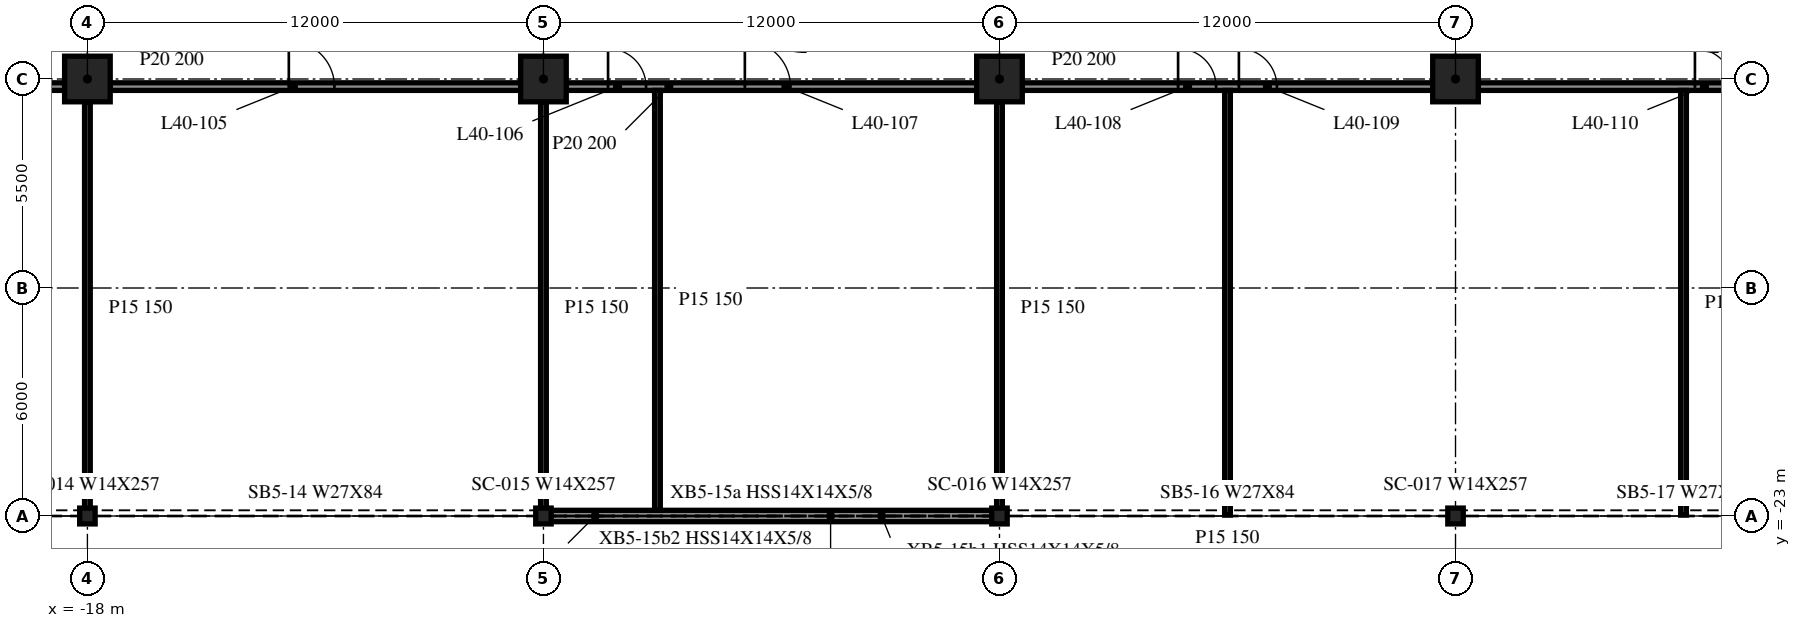
"""IFC4 building model, lengths in metres.
Left out: names, types, materials, properties, quantities, classifications, styles, units other than length and angle.
Written with IfcOpenShell. Run it as: python <this file> out.ifc"""

import sys

from ifc_helpers import new_model, si_unit, direction, frame, frame_2d, origin, origin_2d, place, context, subcontext, project, spatial, rectangle, i_section, extrude, element, fill, save


model = new_model("IFC4")
c1 = context("Model", 3, precision=1e-05, world=origin(), true_north=direction((0.0, 1.0)))
c2 = subcontext(c1, "Body", "Model", "MODEL_VIEW")
j1 = project(units=[si_unit("LENGTHUNIT", "METRE"), si_unit("PLANEANGLEUNIT", "RADIAN")], contexts=[c1])
p1 = place(None, origin())
s1 = spatial("IfcSite", under=j1, at=p1, CompositionType="ELEMENT")
p2 = place(p1, origin())
s2 = spatial("IfcBuilding", under=s1, at=p2, CompositionType="ELEMENT")
p3 = place(p2, frame((0.0, 0.0, 170.6)))
s3 = spatial("IfcBuildingStorey", under=s2, at=p3, CompositionType="ELEMENT", Elevation=170.6)
for number, where, z_axis, x_axis in (
    (1, (-18.0, -11.5, -0.34), (0.0, 0.0, 1.0), (1.0, 0.0, 0.0)),
    (2, (-6.0, -11.5, -0.34), (0.0, 0.0, 1.0), (1.0, 0.0, 0.0)),
    (3, (6.0, -11.5, -0.34), (0.0, 0.0, 1.0), (1.0, 0.0, 0.0)),
    (4, (18.0, -11.5, -0.34), (0.0, 0.0, 1.0), (1.0, 0.0, 0.0)),
):
    element("IfcColumn", number, at=place(p3, frame(where, z_axis=z_axis, x_axis=x_axis)), inside=s3, PredefinedType="COLUMN", context=c2, shape_type="SweptSolid", body=[
        extrude(rectangle(XDim=1.2, YDim=1.2, at=origin_2d()), origin(), (0.0, 0.0, 1.0), 3.8),
    ])
for number, where, z_axis, x_axis in (
    (5, (-18.0, -23.0, -0.34), (0.0, 0.0, 1.0), (1.0, 0.0, 0.0)),
    (6, (-6.0, -23.0, -0.34), (0.0, 0.0, 1.0), (1.0, 0.0, 0.0)),
    (7, (6.0, -23.0, -0.34), (0.0, 0.0, 1.0), (1.0, 0.0, 0.0)),
    (8, (18.0, -23.0, -0.34), (0.0, 0.0, 1.0), (1.0, 0.0, 0.0)),
):
    element("IfcColumn", number, at=place(p3, frame(where, z_axis=z_axis, x_axis=x_axis)), inside=s3, PredefinedType="COLUMN", context=c2, shape_type="SweptSolid", body=[
        extrude(i_section(OverallWidth=0.406, OverallDepth=0.417, WebThickness=0.03, FlangeThickness=0.048, at=origin_2d()), origin(), (0.0, 0.0, 1.0), 3.8),
    ])
p4 = place(p3, frame((-5.985, -23.0, 0.0), z_axis=(0.0, 0.0, 1.0), x_axis=(1.0, 0.0, 0.0)))
e9 = element("IfcWall", 9, at=p4, inside=s3, PredefinedType="NOTDEFINED", context=c2, shape_type="SweptSolid", body=[
    extrude(rectangle(XDim=11.97, YDim=0.3, at=frame_2d((5.985, 0.0))), origin(), (0.0, 0.0, 1.0), 2.782),
])
p5 = place(p3, frame((-29.4, -11.7, 0.0), z_axis=(0.0, 0.0, 1.0), x_axis=(1.0, 0.0, 0.0)))
e10 = element("IfcWall", 10, at=p5, inside=s3, PredefinedType="PARTITIONING", context=c2, shape_type="SweptSolid", body=[
    extrude(rectangle(XDim=10.8, YDim=0.2, at=frame_2d((5.4, 0.0))), origin(), (0.0, 0.0, 1.0), 3.46),
])
p6 = place(p5, frame((4.1, 0.0, 0.0)))
e11 = element("IfcOpeningElement", 11, at=p6, cuts=e10, PredefinedType="OPENING", context=c2, shape_type="SweptSolid", body=[
    extrude(rectangle(XDim=1.0, YDim=2.1, at=frame_2d((0.5, 1.05))), frame((0.0, 0.11, 0.0), z_axis=(0.0, -1.0, 0.0), x_axis=(1.0, 0.0, 0.0)), (0.0, 0.0, 1.0), 0.22),
])
p7 = place(p5, frame((5.7, 0.0, 0.0)))
e12 = element("IfcOpeningElement", 12, at=p7, cuts=e10, PredefinedType="OPENING", context=c2, shape_type="SweptSolid", body=[
    extrude(rectangle(XDim=1.0, YDim=2.1, at=frame_2d((0.5, 1.05))), frame((0.0, 0.11, 0.0), z_axis=(0.0, -1.0, 0.0), x_axis=(1.0, 0.0, 0.0)), (0.0, 0.0, 1.0), 0.22),
])
p8 = place(p3, frame((-17.4, -11.7, 0.0), z_axis=(0.0, 0.0, 1.0), x_axis=(1.0, 0.0, 0.0)))
e13 = element("IfcWall", 13, at=p8, inside=s3, PredefinedType="PARTITIONING", context=c2, shape_type="SweptSolid", body=[
    extrude(rectangle(XDim=10.8, YDim=0.2, at=frame_2d((5.4, 0.0))), origin(), (0.0, 0.0, 1.0), 3.46),
])
p9 = place(p8, frame((4.7, 0.0, 0.0)))
e14 = element("IfcOpeningElement", 14, at=p9, cuts=e13, PredefinedType="OPENING", context=c2, shape_type="SweptSolid", body=[
    extrude(rectangle(XDim=1.2, YDim=2.1, at=frame_2d((0.6, 1.05))), frame((0.0, 0.11, 0.0), z_axis=(0.0, -1.0, 0.0), x_axis=(1.0, 0.0, 0.0)), (0.0, 0.0, 1.0), 0.22),
])
p10 = place(p3, frame((-5.4, -11.7, 0.0), z_axis=(0.0, 0.0, 1.0), x_axis=(1.0, 0.0, 0.0)))
e15 = element("IfcWall", 15, at=p10, inside=s3, PredefinedType="PARTITIONING", context=c2, shape_type="SweptSolid", body=[
    extrude(rectangle(XDim=10.8, YDim=0.2, at=frame_2d((5.4, 0.0))), origin(), (0.0, 0.0, 1.0), 3.46),
])
p11 = place(p10, frame((1.1, 0.0, 0.0)))
e16 = element("IfcOpeningElement", 16, at=p11, cuts=e15, PredefinedType="OPENING", context=c2, shape_type="SweptSolid", body=[
    extrude(rectangle(XDim=1.0, YDim=2.1, at=frame_2d((0.5, 1.05))), frame((0.0, 0.11, 0.0), z_axis=(0.0, -1.0, 0.0), x_axis=(1.0, 0.0, 0.0)), (0.0, 0.0, 1.0), 0.22),
])
p12 = place(p10, frame((4.7, 0.0, 0.0)))
e17 = element("IfcOpeningElement", 17, at=p12, cuts=e15, PredefinedType="OPENING", context=c2, shape_type="SweptSolid", body=[
    extrude(rectangle(XDim=1.2, YDim=2.1, at=frame_2d((0.6, 1.05))), frame((0.0, 0.11, 0.0), z_axis=(0.0, -1.0, 0.0), x_axis=(1.0, 0.0, 0.0)), (0.0, 0.0, 1.0), 0.22),
])
p13 = place(p3, frame((6.6, -11.7, 0.0), z_axis=(0.0, 0.0, 1.0), x_axis=(1.0, 0.0, 0.0)))
e18 = element("IfcWall", 18, at=p13, inside=s3, PredefinedType="PARTITIONING", context=c2, shape_type="SweptSolid", body=[
    extrude(rectangle(XDim=10.8, YDim=0.2, at=frame_2d((5.4, 0.0))), origin(), (0.0, 0.0, 1.0), 3.46),
])
p14 = place(p13, frame((4.1, 0.0, 0.0)))
e19 = element("IfcOpeningElement", 19, at=p14, cuts=e18, PredefinedType="OPENING", context=c2, shape_type="SweptSolid", body=[
    extrude(rectangle(XDim=1.0, YDim=2.1, at=frame_2d((0.5, 1.05))), frame((0.0, 0.11, 0.0), z_axis=(0.0, -1.0, 0.0), x_axis=(1.0, 0.0, 0.0)), (0.0, 0.0, 1.0), 0.22),
])
p15 = place(p13, frame((5.7, 0.0, 0.0)))
e20 = element("IfcOpeningElement", 20, at=p15, cuts=e18, PredefinedType="OPENING", context=c2, shape_type="SweptSolid", body=[
    extrude(rectangle(XDim=1.0, YDim=2.1, at=frame_2d((0.5, 1.05))), frame((0.0, 0.11, 0.0), z_axis=(0.0, -1.0, 0.0), x_axis=(1.0, 0.0, 0.0)), (0.0, 0.0, 1.0), 0.22),
])
p16 = place(p3, frame((18.6, -11.7, 0.0), z_axis=(0.0, 0.0, 1.0), x_axis=(1.0, 0.0, 0.0)))
e21 = element("IfcWall", 21, at=p16, inside=s3, PredefinedType="PARTITIONING", context=c2, shape_type="SweptSolid", body=[
    extrude(rectangle(XDim=10.8, YDim=0.2, at=frame_2d((5.4, 0.0))), origin(), (0.0, 0.0, 1.0), 3.46),
])
p17 = place(p16, frame((5.7, 0.0, 0.0)))
e22 = element("IfcOpeningElement", 22, at=p17, cuts=e21, PredefinedType="OPENING", context=c2, shape_type="SweptSolid", body=[
    extrude(rectangle(XDim=1.0, YDim=2.1, at=frame_2d((0.5, 1.05))), frame((0.0, 0.11, 0.0), z_axis=(0.0, -1.0, 0.0), x_axis=(1.0, 0.0, 0.0)), (0.0, 0.0, 1.0), 0.22),
])
for number, where, z_axis, x_axis in (
    (23, (-18.0, -22.975, 0.0), (0.0, 0.0, 1.0), (0.0, 1.0, 0.0)),
    (24, (-6.0, -22.975, 0.0), (0.0, 0.0, 1.0), (0.0, 1.0, 0.0)),
):
    element("IfcWall", number, at=place(p3, frame(where, z_axis=z_axis, x_axis=x_axis)), inside=s3, PredefinedType="PARTITIONING", context=c2, shape_type="SweptSolid", body=[
        extrude(rectangle(XDim=10.875, YDim=0.15, at=frame_2d((5.438, 0.0))), origin(), (0.0, 0.0, 1.0), 3.46),
    ])
p18 = place(p3, frame((-3.0, -22.85, 0.0), z_axis=(0.0, 0.0, 1.0), x_axis=(0.0, 1.0, 0.0)))
e25 = element("IfcWall", 25, at=p18, inside=s3, PredefinedType="PARTITIONING", context=c2, shape_type="SweptSolid", body=[
    extrude(rectangle(XDim=11.05, YDim=0.15, at=frame_2d((5.525, 0.0))), origin(), (0.0, 0.0, 1.0), 3.46),
])
p19 = place(p3, frame((6.0, -22.975, 0.0), z_axis=(0.0, 0.0, 1.0), x_axis=(0.0, 1.0, 0.0)))
e26 = element("IfcWall", 26, at=p19, inside=s3, PredefinedType="PARTITIONING", context=c2, shape_type="SweptSolid", body=[
    extrude(rectangle(XDim=10.875, YDim=0.15, at=frame_2d((5.438, 0.0))), origin(), (0.0, 0.0, 1.0), 3.46),
])
for number, where, z_axis, x_axis in (
    (27, (12.0, -22.975, 0.0), (0.0, 0.0, 1.0), (0.0, 1.0, 0.0)),
    (28, (24.0, -22.975, 0.0), (0.0, 0.0, 1.0), (0.0, 1.0, 0.0)),
):
    element("IfcWall", number, at=place(p3, frame(where, z_axis=z_axis, x_axis=x_axis)), inside=s3, PredefinedType="PARTITIONING", context=c2, shape_type="SweptSolid", body=[
        extrude(rectangle(XDim=11.175, YDim=0.15, at=frame_2d((5.587, 0.0))), origin(), (0.0, 0.0, 1.0), 3.46),
    ])
p20 = place(p9, origin())
e29 = element("IfcDoor", 29, at=p20, inside=s3, OperationType="SINGLE_SWING_RIGHT", PredefinedType="DOOR", context=c2, shape_type="SweptSolid", body=[
    extrude(rectangle(XDim=1.2, YDim=2.1, at=frame_2d((0.6, 1.05))), frame((0.0, 0.025, 0.0), z_axis=(0.0, -1.0, 0.0), x_axis=(1.0, 0.0, 0.0)), (0.0, 0.0, 1.0), 0.05),
])
fill(e14, e29)
p21 = place(p11, origin())
e30 = element("IfcDoor", 30, at=p21, inside=s3, OperationType="SINGLE_SWING_RIGHT", PredefinedType="DOOR", context=c2, shape_type="SweptSolid", body=[
    extrude(rectangle(XDim=1.0, YDim=2.1, at=frame_2d((0.5, 1.05))), frame((0.0, 0.025, 0.0), z_axis=(0.0, -1.0, 0.0), x_axis=(1.0, 0.0, 0.0)), (0.0, 0.0, 1.0), 0.05),
])
fill(e16, e30)
p22 = place(p12, origin())
e31 = element("IfcDoor", 31, at=p22, inside=s3, OperationType="SINGLE_SWING_RIGHT", PredefinedType="DOOR", context=c2, shape_type="SweptSolid", body=[
    extrude(rectangle(XDim=1.2, YDim=2.1, at=frame_2d((0.6, 1.05))), frame((0.0, 0.025, 0.0), z_axis=(0.0, -1.0, 0.0), x_axis=(1.0, 0.0, 0.0)), (0.0, 0.0, 1.0), 0.05),
])
fill(e17, e31)
p23 = place(p14, origin())
e32 = element("IfcDoor", 32, at=p23, inside=s3, OperationType="SINGLE_SWING_RIGHT", PredefinedType="DOOR", context=c2, shape_type="SweptSolid", body=[
    extrude(rectangle(XDim=1.0, YDim=2.1, at=frame_2d((0.5, 1.05))), frame((0.0, 0.025, 0.0), z_axis=(0.0, -1.0, 0.0), x_axis=(1.0, 0.0, 0.0)), (0.0, 0.0, 1.0), 0.05),
])
fill(e19, e32)
p24 = place(p15, origin())
e33 = element("IfcDoor", 33, at=p24, inside=s3, OperationType="SINGLE_SWING_LEFT", PredefinedType="DOOR", context=c2, shape_type="SweptSolid", body=[
    extrude(rectangle(XDim=1.0, YDim=2.1, at=frame_2d((0.5, 1.05))), frame((0.0, 0.025, 0.0), z_axis=(0.0, -1.0, 0.0), x_axis=(1.0, 0.0, 0.0)), (0.0, 0.0, 1.0), 0.05),
])
fill(e20, e33)
p25 = place(p17, origin())
e34 = element("IfcDoor", 34, at=p25, inside=s3, OperationType="SINGLE_SWING_LEFT", PredefinedType="DOOR", context=c2, shape_type="SweptSolid", body=[
    extrude(rectangle(XDim=1.0, YDim=2.1, at=frame_2d((0.5, 1.05))), frame((0.0, 0.025, 0.0), z_axis=(0.0, -1.0, 0.0), x_axis=(1.0, 0.0, 0.0)), (0.0, 0.0, 1.0), 0.05),
])
fill(e22, e34)
save(model, sys.argv[1])
